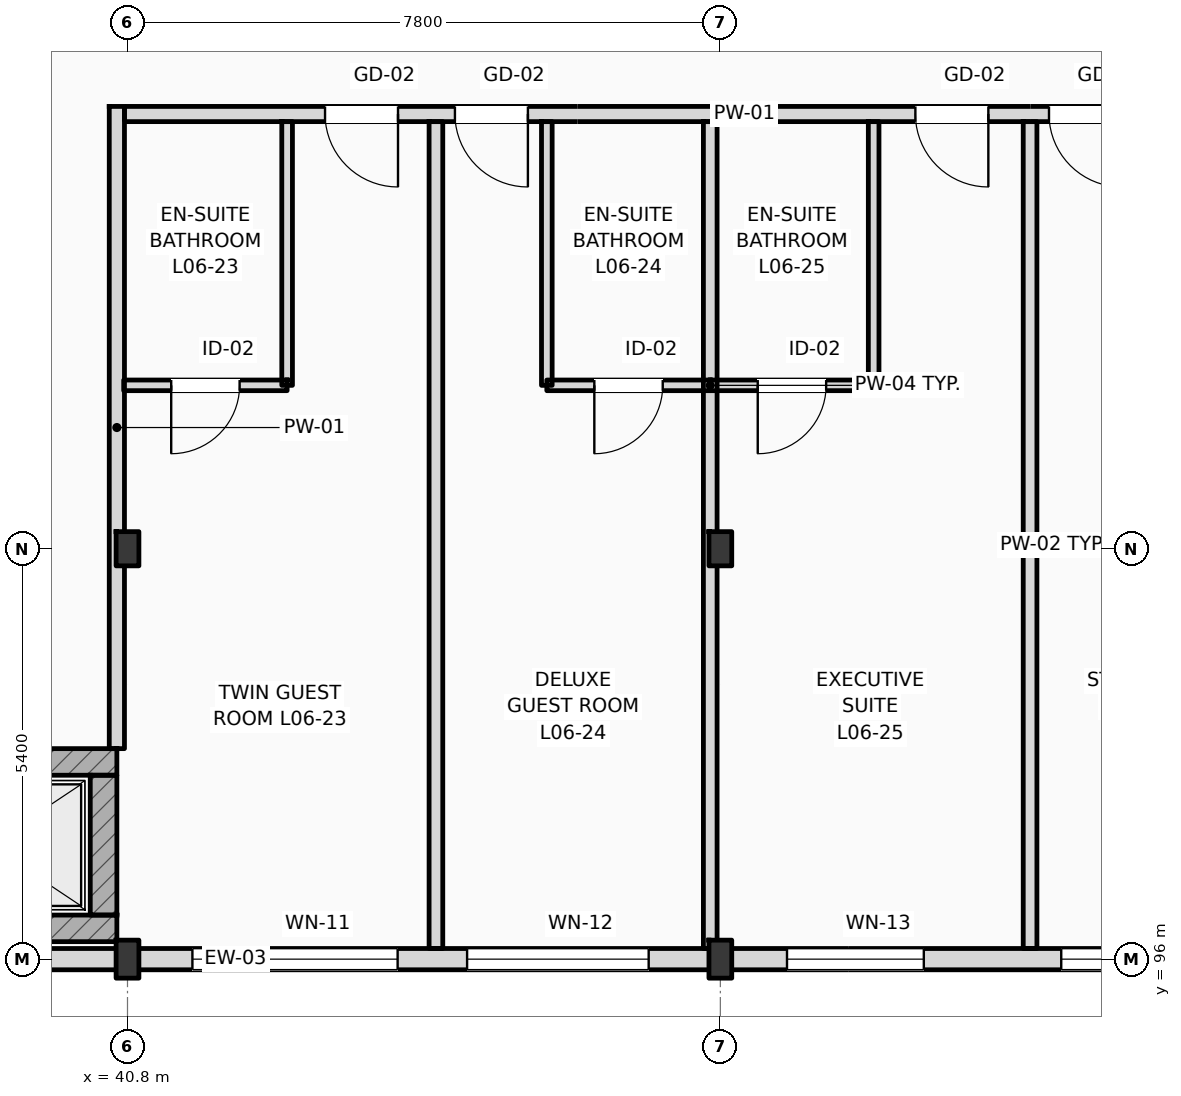
"""IFC4 building model, lengths in metres.
Left out: names, types, materials, properties, quantities, classifications, styles, units other than length and angle.
Written with IfcOpenShell. Run it as: python <this file> out.ifc"""

import sys

from ifc_helpers import new_model, si_unit, direction, frame, frame_2d, origin, origin_2d, place, context, subcontext, project, spatial, rectangle, i_section, extrude, element, fill, save


model = new_model("IFC4")
c1 = context("Model", 3, precision=1e-05, world=origin(), true_north=direction((0.0, 1.0)))
c2 = subcontext(c1, "Body", "Model", "MODEL_VIEW")
j1 = project(units=[si_unit("LENGTHUNIT", "METRE"), si_unit("PLANEANGLEUNIT", "RADIAN")], contexts=[c1])
p1 = place(None, origin())
s1 = spatial("IfcSite", under=j1, at=p1, CompositionType="ELEMENT")
p2 = place(p1, origin())
s2 = spatial("IfcBuilding", under=s1, at=p2, CompositionType="ELEMENT")
p3 = place(p2, frame((0.0, 0.0, 28.2)))
s3 = spatial("IfcBuildingStorey", under=s2, at=p3, CompositionType="ELEMENT", Elevation=28.2)
p4 = place(p3, frame((40.8, 96.0, 0.0), z_axis=(0.0, 0.0, 1.0), x_axis=(1.0, 0.0, 0.0)))
e1 = element("IfcColumn", 1, at=p4, inside=s3, PredefinedType="COLUMN", context=c2, shape_type="SweptSolid", body=[
    extrude(i_section(OverallWidth=0.3, OverallDepth=0.5, WebThickness=0.014, FlangeThickness=0.028, FilletRadius=0.027, at=origin_2d()), origin(), (0.0, 0.0, 1.0), 3.6),
])
p5 = place(p3, frame((40.8, 101.4, 0.0), z_axis=(0.0, 0.0, 1.0), x_axis=(1.0, 0.0, 0.0)))
e2 = element("IfcColumn", 2, at=p5, inside=s3, PredefinedType="COLUMN", context=c2, shape_type="SweptSolid", body=[
    extrude(i_section(OverallWidth=0.3, OverallDepth=0.45, WebThickness=0.014, FlangeThickness=0.026, FilletRadius=0.027, at=origin_2d()), origin(), (0.0, 0.0, 1.0), 3.6),
])
p6 = place(p3, frame((48.6, 96.0, 0.0), z_axis=(0.0, 0.0, 1.0), x_axis=(1.0, 0.0, 0.0)))
e3 = element("IfcColumn", 3, at=p6, inside=s3, PredefinedType="COLUMN", context=c2, shape_type="SweptSolid", body=[
    extrude(i_section(OverallWidth=0.3, OverallDepth=0.5, WebThickness=0.014, FlangeThickness=0.028, FilletRadius=0.027, at=origin_2d()), origin(), (0.0, 0.0, 1.0), 3.6),
])
p7 = place(p3, frame((48.6, 101.4, 0.0), z_axis=(0.0, 0.0, 1.0), x_axis=(1.0, 0.0, 0.0)))
e4 = element("IfcColumn", 4, at=p7, inside=s3, PredefinedType="COLUMN", context=c2, shape_type="SweptSolid", body=[
    extrude(i_section(OverallWidth=0.3, OverallDepth=0.45, WebThickness=0.014, FlangeThickness=0.026, FilletRadius=0.027, at=origin_2d()), origin(), (0.0, 0.0, 1.0), 3.6),
])
p8 = place(p3, frame((25.2, 96.0, 0.0), z_axis=(0.0, 0.0, 1.0), x_axis=(1.0, 0.0, 0.0)))
e5 = element("IfcWall", 5, at=p8, inside=s3, PredefinedType="STANDARD", context=c2, shape_type="SweptSolid", body=[
    extrude(rectangle(XDim=94.8, YDim=0.28, at=frame_2d((47.4, 0.0))), origin(), (0.0, 0.0, 1.0), 2.8),
])
p9 = place(p8, frame((16.454, 0.0, 0.9)))
e6 = element("IfcOpeningElement", 6, at=p9, cuts=e5, PredefinedType="OPENING", context=c2, shape_type="SweptSolid", body=[
    extrude(rectangle(XDim=2.7, YDim=1.72, at=frame_2d((1.35, 0.86))), frame((0.0, 0.15, 0.0), z_axis=(0.0, -1.0, 0.0), x_axis=(1.0, 0.0, 0.0)), (0.0, 0.0, 1.0), 0.3),
])
p10 = place(p8, frame((20.068, 0.0, 0.9)))
e7 = element("IfcOpeningElement", 7, at=p10, cuts=e5, PredefinedType="OPENING", context=c2, shape_type="SweptSolid", body=[
    extrude(rectangle(XDim=2.389, YDim=1.72, at=frame_2d((1.194, 0.86))), frame((0.0, 0.15, 0.0), z_axis=(0.0, -1.0, 0.0), x_axis=(1.0, 0.0, 0.0)), (0.0, 0.0, 1.0), 0.3),
])
p11 = place(p8, frame((24.277, 0.0, 0.9)))
e8 = element("IfcOpeningElement", 8, at=p11, cuts=e5, PredefinedType="OPENING", context=c2, shape_type="SweptSolid", body=[
    extrude(rectangle(XDim=1.8, YDim=1.72, at=frame_2d((0.9, 0.86))), frame((0.0, 0.15, 0.0), z_axis=(0.0, -1.0, 0.0), x_axis=(1.0, 0.0, 0.0)), (0.0, 0.0, 1.0), 0.3),
])
p12 = place(p8, frame((27.885, 0.0, 0.9)))
e9 = element("IfcOpeningElement", 9, at=p12, cuts=e5, PredefinedType="OPENING", context=c2, shape_type="SweptSolid", body=[
    extrude(rectangle(XDim=2.388, YDim=1.72, at=frame_2d((1.194, 0.86))), frame((0.0, 0.15, 0.0), z_axis=(0.0, -1.0, 0.0), x_axis=(1.0, 0.0, 0.0)), (0.0, 0.0, 1.0), 0.3),
])
p13 = place(p8, frame((32.093, 0.0, 0.9)))
e10 = element("IfcOpeningElement", 10, at=p13, cuts=e5, PredefinedType="OPENING", context=c2, shape_type="SweptSolid", body=[
    extrude(rectangle(XDim=1.8, YDim=1.72, at=frame_2d((0.9, 0.86))), frame((0.0, 0.15, 0.0), z_axis=(0.0, -1.0, 0.0), x_axis=(1.0, 0.0, 0.0)), (0.0, 0.0, 1.0), 0.3),
])
p14 = place(p8, frame((35.702, 0.0, 0.9)))
e11 = element("IfcOpeningElement", 11, at=p14, cuts=e5, PredefinedType="OPENING", context=c2, shape_type="SweptSolid", body=[
    extrude(rectangle(XDim=2.488, YDim=1.72, at=frame_2d((1.244, 0.86))), frame((0.0, 0.15, 0.0), z_axis=(0.0, -1.0, 0.0), x_axis=(1.0, 0.0, 0.0)), (0.0, 0.0, 1.0), 0.3),
])
p15 = place(p8, frame((55.56, 0.0, 0.9)))
e12 = element("IfcOpeningElement", 12, at=p15, cuts=e5, PredefinedType="OPENING", context=c2, shape_type="SweptSolid", body=[
    extrude(rectangle(XDim=1.8, YDim=1.72, at=frame_2d((0.9, 0.86))), frame((0.0, 0.15, 0.0), z_axis=(0.0, -1.0, 0.0), x_axis=(1.0, 0.0, 0.0)), (0.0, 0.0, 1.0), 0.3),
])
p16 = place(p8, frame((58.985, 0.0, 0.9)))
e13 = element("IfcOpeningElement", 13, at=p16, cuts=e5, PredefinedType="OPENING", context=c2, shape_type="SweptSolid", body=[
    extrude(rectangle(XDim=1.8, YDim=1.72, at=frame_2d((0.9, 0.86))), frame((0.0, 0.15, 0.0), z_axis=(0.0, -1.0, 0.0), x_axis=(1.0, 0.0, 0.0)), (0.0, 0.0, 1.0), 0.3),
])
p17 = place(p8, frame((63.21, 0.0, 0.9)))
e14 = element("IfcOpeningElement", 14, at=p17, cuts=e5, PredefinedType="OPENING", context=c2, shape_type="SweptSolid", body=[
    extrude(rectangle(XDim=2.525, YDim=1.72, at=frame_2d((1.262, 0.86))), frame((0.0, 0.15, 0.0), z_axis=(0.0, -1.0, 0.0), x_axis=(1.0, 0.0, 0.0)), (0.0, 0.0, 1.0), 0.3),
])
p18 = place(p8, frame((66.955, 0.0, 0.9)))
e15 = element("IfcOpeningElement", 15, at=p18, cuts=e5, PredefinedType="OPENING", context=c2, shape_type="SweptSolid", body=[
    extrude(rectangle(XDim=1.8, YDim=1.72, at=frame_2d((0.9, 0.86))), frame((0.0, 0.15, 0.0), z_axis=(0.0, -1.0, 0.0), x_axis=(1.0, 0.0, 0.0)), (0.0, 0.0, 1.0), 0.3),
])
p19 = place(p8, frame((71.892, 0.0, 0.9)))
e16 = element("IfcOpeningElement", 16, at=p19, cuts=e5, PredefinedType="OPENING", context=c2, shape_type="SweptSolid", body=[
    extrude(rectangle(XDim=1.1, YDim=1.5, at=frame_2d((0.55, 0.75))), frame((0.0, 0.15, 0.0), z_axis=(0.0, -1.0, 0.0), x_axis=(1.0, 0.0, 0.0)), (0.0, 0.0, 1.0), 0.3),
])
p20 = place(p8, frame((75.802, 0.0, 0.9)))
e17 = element("IfcOpeningElement", 17, at=p20, cuts=e5, PredefinedType="OPENING", context=c2, shape_type="SweptSolid", body=[
    extrude(rectangle(XDim=1.25, YDim=1.6, at=frame_2d((0.625, 0.8))), frame((0.0, 0.15, 0.0), z_axis=(0.0, -1.0, 0.0), x_axis=(1.0, 0.0, 0.0)), (0.0, 0.0, 1.0), 0.3),
])
p21 = place(p8, frame((79.712, 0.0, 0.9)))
e18 = element("IfcOpeningElement", 18, at=p21, cuts=e5, PredefinedType="OPENING", context=c2, shape_type="SweptSolid", body=[
    extrude(rectangle(XDim=1.4, YDim=1.7, at=frame_2d((0.7, 0.85))), frame((0.0, 0.15, 0.0), z_axis=(0.0, -1.0, 0.0), x_axis=(1.0, 0.0, 0.0)), (0.0, 0.0, 1.0), 0.3),
])
p22 = place(p8, frame((83.597, 0.0, 0.9)))
e19 = element("IfcOpeningElement", 19, at=p22, cuts=e5, PredefinedType="OPENING", context=c2, shape_type="SweptSolid", body=[
    extrude(rectangle(XDim=1.6, YDim=1.72, at=frame_2d((0.8, 0.86))), frame((0.0, 0.15, 0.0), z_axis=(0.0, -1.0, 0.0), x_axis=(1.0, 0.0, 0.0)), (0.0, 0.0, 1.0), 0.3),
])
p23 = place(p8, frame((87.507, 0.0, 0.9)))
e20 = element("IfcOpeningElement", 20, at=p23, cuts=e5, PredefinedType="OPENING", context=c2, shape_type="SweptSolid", body=[
    extrude(rectangle(XDim=1.75, YDim=1.72, at=frame_2d((0.875, 0.86))), frame((0.0, 0.15, 0.0), z_axis=(0.0, -1.0, 0.0), x_axis=(1.0, 0.0, 0.0)), (0.0, 0.0, 1.0), 0.3),
])
p24 = place(p8, frame((91.328, 0.0, 0.9)))
e21 = element("IfcOpeningElement", 21, at=p24, cuts=e5, PredefinedType="OPENING", context=c2, shape_type="SweptSolid", body=[
    extrude(rectangle(XDim=2.0, YDim=1.72, at=frame_2d((1.0, 0.86))), frame((0.0, 0.15, 0.0), z_axis=(0.0, -1.0, 0.0), x_axis=(1.0, 0.0, 0.0)), (0.0, 0.0, 1.0), 0.3),
])
p25 = place(p3, frame((37.67, 98.595, 0.0), z_axis=(0.0, 0.0, 1.0), x_axis=(1.0, 0.0, 0.0)))
e22 = element("IfcWall", 22, at=p25, inside=s3, PredefinedType="SHEAR", context=c2, shape_type="SweptSolid", body=[
    extrude(rectangle(XDim=2.99, YDim=0.35, at=frame_2d((1.495, 0.0))), origin(), (0.0, 0.0, 1.0), 3.36),
])
p26 = place(p25, frame((0.695, 0.0, 0.0)))
e23 = element("IfcOpeningElement", 23, at=p26, cuts=e22, PredefinedType="OPENING", context=c2, shape_type="SweptSolid", body=[
    extrude(rectangle(XDim=1.25, YDim=2.25, at=frame_2d((0.625, 1.125))), frame((0.0, 0.185, 0.0), z_axis=(0.0, -1.0, 0.0), x_axis=(1.0, 0.0, 0.0)), (0.0, 0.0, 1.0), 0.37),
])
p27 = place(p3, frame((37.67, 96.405, 0.0), z_axis=(0.0, 0.0, 1.0), x_axis=(1.0, 0.0, 0.0)))
e24 = element("IfcWall", 24, at=p27, inside=s3, PredefinedType="SHEAR", context=c2, shape_type="SweptSolid", body=[
    extrude(rectangle(XDim=2.99, YDim=0.35, at=frame_2d((1.495, 0.0))), origin(), (0.0, 0.0, 1.0), 3.36),
])
p28 = place(p3, frame((40.485, 96.58, 0.0), z_axis=(0.0, 0.0, 1.0), x_axis=(0.0, 1.0, 0.0)))
e25 = element("IfcWall", 25, at=p28, inside=s3, PredefinedType="SHEAR", context=c2, shape_type="SweptSolid", body=[
    extrude(rectangle(XDim=1.84, YDim=0.35, at=frame_2d((0.92, 0.0))), origin(), (0.0, 0.0, 1.0), 2.99),
])
p29 = place(p3, frame((40.76, 107.12, 0.0), z_axis=(0.0, 0.0, 1.0), x_axis=(1.0, 0.0, 0.0)))
e26 = element("IfcWall", 26, at=p29, inside=s3, PredefinedType="PARTITIONING", context=c2, shape_type="SweptSolid", body=[
    extrude(rectangle(XDim=23.44, YDim=0.2, at=frame_2d((11.72, 0.0))), origin(), (0.0, 0.0, 1.0), 3.36),
])
p30 = place(p29, frame((2.639, 0.0, 0.0)))
e27 = element("IfcOpeningElement", 27, at=p30, cuts=e26, PredefinedType="OPENING", context=c2, shape_type="SweptSolid", body=[
    extrude(rectangle(XDim=0.96, YDim=2.2, at=frame_2d((0.48, 1.1))), frame((0.0, 0.11, 0.0), z_axis=(0.0, -1.0, 0.0), x_axis=(1.0, 0.0, 0.0)), (0.0, 0.0, 1.0), 0.22),
])
p31 = place(p29, frame((4.348, 0.0, 0.0)))
e28 = element("IfcOpeningElement", 28, at=p31, cuts=e26, PredefinedType="OPENING", context=c2, shape_type="SweptSolid", body=[
    extrude(rectangle(XDim=0.96, YDim=2.2, at=frame_2d((0.48, 1.1))), frame((0.0, 0.11, 0.0), z_axis=(0.0, -1.0, 0.0), x_axis=(1.0, 0.0, 0.0)), (0.0, 0.0, 1.0), 0.22),
])
p32 = place(p29, frame((10.406, 0.0, 0.0)))
e29 = element("IfcOpeningElement", 29, at=p32, cuts=e26, PredefinedType="OPENING", context=c2, shape_type="SweptSolid", body=[
    extrude(rectangle(XDim=0.96, YDim=2.2, at=frame_2d((0.48, 1.1))), frame((0.0, 0.11, 0.0), z_axis=(0.0, -1.0, 0.0), x_axis=(1.0, 0.0, 0.0)), (0.0, 0.0, 1.0), 0.22),
])
p33 = place(p29, frame((12.164, 0.0, 0.0)))
e30 = element("IfcOpeningElement", 30, at=p33, cuts=e26, PredefinedType="OPENING", context=c2, shape_type="SweptSolid", body=[
    extrude(rectangle(XDim=0.96, YDim=2.2, at=frame_2d((0.48, 1.1))), frame((0.0, 0.11, 0.0), z_axis=(0.0, -1.0, 0.0), x_axis=(1.0, 0.0, 0.0)), (0.0, 0.0, 1.0), 0.22),
])
p34 = place(p29, frame((18.223, 0.0, 0.0)))
e31 = element("IfcOpeningElement", 31, at=p34, cuts=e26, PredefinedType="OPENING", context=c2, shape_type="SweptSolid", body=[
    extrude(rectangle(XDim=0.96, YDim=2.2, at=frame_2d((0.48, 1.1))), frame((0.0, 0.11, 0.0), z_axis=(0.0, -1.0, 0.0), x_axis=(1.0, 0.0, 0.0)), (0.0, 0.0, 1.0), 0.22),
])
p35 = place(p29, frame((20.031, 0.0, 0.0)))
e32 = element("IfcOpeningElement", 32, at=p35, cuts=e26, PredefinedType="OPENING", context=c2, shape_type="SweptSolid", body=[
    extrude(rectangle(XDim=0.96, YDim=2.2, at=frame_2d((0.48, 1.1))), frame((0.0, 0.11, 0.0), z_axis=(0.0, -1.0, 0.0), x_axis=(1.0, 0.0, 0.0)), (0.0, 0.0, 1.0), 0.22),
])
p36 = place(p3, frame((40.66, 98.77, 0.0), z_axis=(0.0, 0.0, 1.0), x_axis=(0.0, 1.0, 0.0)))
e33 = element("IfcWall", 33, at=p36, inside=s3, PredefinedType="PARTITIONING", context=c2, shape_type="SweptSolid", body=[
    extrude(rectangle(XDim=8.45, YDim=0.2, at=frame_2d((4.225, 0.0))), origin(), (0.0, 0.0, 1.0), 2.99),
])
p37 = place(p3, frame((44.858, 96.14, 0.0), z_axis=(0.0, 0.0, 1.0), x_axis=(0.0, 1.0, 0.0)))
e34 = element("IfcWall", 34, at=p37, inside=s3, PredefinedType="PARTITIONING", context=c2, shape_type="SweptSolid", body=[
    extrude(rectangle(XDim=10.88, YDim=0.18, at=frame_2d((5.44, 0.0))), origin(), (0.0, 0.0, 1.0), 3.36),
])
p38 = place(p3, frame((42.9, 103.55, 0.0), z_axis=(0.0, 0.0, 1.0), x_axis=(0.0, 1.0, 0.0)))
e35 = element("IfcWall", 35, at=p38, inside=s3, PredefinedType="PARTITIONING", context=c2, shape_type="SweptSolid", body=[
    extrude(rectangle(XDim=3.47, YDim=0.14, at=frame_2d((1.735, 0.0))), origin(), (0.0, 0.0, 1.0), 3.36),
])
p39 = place(p3, frame((40.75, 103.55, 0.0), z_axis=(0.0, 0.0, 1.0), x_axis=(1.0, 0.0, 0.0)))
e36 = element("IfcWall", 36, at=p39, inside=s3, PredefinedType="PARTITIONING", context=c2, shape_type="SweptSolid", body=[
    extrude(rectangle(XDim=2.15, YDim=0.14, at=frame_2d((1.075, 0.0))), origin(), (0.0, 0.0, 1.0), 3.36),
])
p40 = place(p39, frame((0.625, 0.0, 0.0)))
e37 = element("IfcOpeningElement", 37, at=p40, cuts=e36, PredefinedType="OPENING", context=c2, shape_type="SweptSolid", body=[
    extrude(rectangle(XDim=0.9, YDim=2.1, at=frame_2d((0.45, 1.05))), frame((0.0, 0.08, 0.0), z_axis=(0.0, -1.0, 0.0), x_axis=(1.0, 0.0, 0.0)), (0.0, 0.0, 1.0), 0.16),
])
p41 = place(p3, frame((48.467, 96.14, 0.0), z_axis=(0.0, 0.0, 1.0), x_axis=(0.0, 1.0, 0.0)))
e38 = element("IfcWall", 38, at=p41, inside=s3, PredefinedType="PARTITIONING", context=c2, shape_type="SweptSolid", body=[
    extrude(rectangle(XDim=10.88, YDim=0.18, at=frame_2d((5.44, 0.0))), origin(), (0.0, 0.0, 1.0), 2.99),
])
p42 = place(p3, frame((46.317, 103.55, 0.0), z_axis=(0.0, 0.0, 1.0), x_axis=(0.0, 1.0, 0.0)))
e39 = element("IfcWall", 39, at=p42, inside=s3, PredefinedType="PARTITIONING", context=c2, shape_type="SweptSolid", body=[
    extrude(rectangle(XDim=3.47, YDim=0.14, at=frame_2d((1.735, 0.0))), origin(), (0.0, 0.0, 1.0), 3.36),
])
p43 = place(p3, frame((46.317, 103.55, 0.0), z_axis=(0.0, 0.0, 1.0), x_axis=(1.0, 0.0, 0.0)))
e40 = element("IfcWall", 40, at=p43, inside=s3, PredefinedType="PARTITIONING", context=c2, shape_type="SweptSolid", body=[
    extrude(rectangle(XDim=2.15, YDim=0.14, at=frame_2d((1.075, 0.0))), origin(), (0.0, 0.0, 1.0), 3.36),
])
p44 = place(p43, frame((0.625, 0.0, 0.0)))
e41 = element("IfcOpeningElement", 41, at=p44, cuts=e40, PredefinedType="OPENING", context=c2, shape_type="SweptSolid", body=[
    extrude(rectangle(XDim=0.9, YDim=2.1, at=frame_2d((0.45, 1.05))), frame((0.0, 0.08, 0.0), z_axis=(0.0, -1.0, 0.0), x_axis=(1.0, 0.0, 0.0)), (0.0, 0.0, 1.0), 0.16),
])
p45 = place(p3, frame((52.675, 96.14, 0.0), z_axis=(0.0, 0.0, 1.0), x_axis=(0.0, 1.0, 0.0)))
e42 = element("IfcWall", 42, at=p45, inside=s3, PredefinedType="PARTITIONING", context=c2, shape_type="SweptSolid", body=[
    extrude(rectangle(XDim=10.88, YDim=0.18, at=frame_2d((5.44, 0.0))), origin(), (0.0, 0.0, 1.0), 3.36),
])
p46 = place(p3, frame((50.617, 103.55, 0.0), z_axis=(0.0, 0.0, 1.0), x_axis=(0.0, 1.0, 0.0)))
e43 = element("IfcWall", 43, at=p46, inside=s3, PredefinedType="PARTITIONING", context=c2, shape_type="SweptSolid", body=[
    extrude(rectangle(XDim=3.47, YDim=0.14, at=frame_2d((1.735, 0.0))), origin(), (0.0, 0.0, 1.0), 3.36),
])
p47 = place(p3, frame((48.467, 103.55, 0.0), z_axis=(0.0, 0.0, 1.0), x_axis=(1.0, 0.0, 0.0)))
e44 = element("IfcWall", 44, at=p47, inside=s3, PredefinedType="PARTITIONING", context=c2, shape_type="SweptSolid", body=[
    extrude(rectangle(XDim=2.15, YDim=0.14, at=frame_2d((1.075, 0.0))), origin(), (0.0, 0.0, 1.0), 3.36),
])
p48 = place(p47, frame((0.625, 0.0, 0.0)))
e45 = element("IfcOpeningElement", 45, at=p48, cuts=e44, PredefinedType="OPENING", context=c2, shape_type="SweptSolid", body=[
    extrude(rectangle(XDim=0.9, YDim=2.1, at=frame_2d((0.45, 1.05))), frame((0.0, 0.08, 0.0), z_axis=(0.0, -1.0, 0.0), x_axis=(1.0, 0.0, 0.0)), (0.0, 0.0, 1.0), 0.16),
])
p49 = place(p9, origin())
e46 = element("IfcWindow", 46, at=p49, inside=s3, PartitioningType="DOUBLE_PANEL_VERTICAL", PredefinedType="WINDOW", context=c2, shape_type="SweptSolid", body=[
    extrude(rectangle(XDim=2.7, YDim=1.72, at=frame_2d((1.35, 0.86))), frame((0.0, 0.03, 0.0), z_axis=(0.0, -1.0, 0.0), x_axis=(1.0, 0.0, 0.0)), (0.0, 0.0, 1.0), 0.06),
])
fill(e6, e46)
p50 = place(p10, origin())
e47 = element("IfcWindow", 47, at=p50, inside=s3, PartitioningType="DOUBLE_PANEL_VERTICAL", PredefinedType="WINDOW", context=c2, shape_type="SweptSolid", body=[
    extrude(rectangle(XDim=2.389, YDim=1.72, at=frame_2d((1.194, 0.86))), frame((0.0, 0.03, 0.0), z_axis=(0.0, -1.0, 0.0), x_axis=(1.0, 0.0, 0.0)), (0.0, 0.0, 1.0), 0.06),
])
fill(e7, e47)
p51 = place(p11, origin())
e48 = element("IfcWindow", 48, at=p51, inside=s3, PartitioningType="DOUBLE_PANEL_VERTICAL", PredefinedType="WINDOW", context=c2, shape_type="SweptSolid", body=[
    extrude(rectangle(XDim=1.8, YDim=1.72, at=frame_2d((0.9, 0.86))), frame((0.0, 0.03, 0.0), z_axis=(0.0, -1.0, 0.0), x_axis=(1.0, 0.0, 0.0)), (0.0, 0.0, 1.0), 0.06),
])
fill(e8, e48)
p52 = place(p12, origin())
e49 = element("IfcWindow", 49, at=p52, inside=s3, PartitioningType="DOUBLE_PANEL_VERTICAL", PredefinedType="WINDOW", context=c2, shape_type="SweptSolid", body=[
    extrude(rectangle(XDim=2.388, YDim=1.72, at=frame_2d((1.194, 0.86))), frame((0.0, 0.03, 0.0), z_axis=(0.0, -1.0, 0.0), x_axis=(1.0, 0.0, 0.0)), (0.0, 0.0, 1.0), 0.06),
])
fill(e9, e49)
p53 = place(p30, frame((0.96, 0.0, 0.0), z_axis=(0.0, 0.0, 1.0), x_axis=(-1.0, 0.0, 0.0)))
e50 = element("IfcDoor", 50, at=p53, inside=s3, OperationType="SINGLE_SWING_RIGHT", PredefinedType="DOOR", context=c2, shape_type="SweptSolid", body=[
    extrude(rectangle(XDim=0.96, YDim=2.2, at=frame_2d((0.48, 1.1))), frame((0.0, 0.025, 0.0), z_axis=(0.0, -1.0, 0.0), x_axis=(1.0, 0.0, 0.0)), (0.0, 0.0, 1.0), 0.05),
])
fill(e27, e50)
p54 = place(p40, frame((0.9, 0.0, 0.0), z_axis=(0.0, 0.0, 1.0), x_axis=(-1.0, 0.0, 0.0)))
e51 = element("IfcDoor", 51, at=p54, inside=s3, OperationType="SINGLE_SWING_LEFT", PredefinedType="DOOR", context=c2, shape_type="SweptSolid", body=[
    extrude(rectangle(XDim=0.9, YDim=2.1, at=frame_2d((0.45, 1.05))), frame((0.0, 0.025, 0.0), z_axis=(0.0, -1.0, 0.0), x_axis=(1.0, 0.0, 0.0)), (0.0, 0.0, 1.0), 0.05),
])
fill(e37, e51)
p55 = place(p31, frame((0.96, 0.0, 0.0), z_axis=(0.0, 0.0, 1.0), x_axis=(-1.0, 0.0, 0.0)))
e52 = element("IfcDoor", 52, at=p55, inside=s3, OperationType="SINGLE_SWING_RIGHT", PredefinedType="DOOR", context=c2, shape_type="SweptSolid", body=[
    extrude(rectangle(XDim=0.96, YDim=2.2, at=frame_2d((0.48, 1.1))), frame((0.0, 0.025, 0.0), z_axis=(0.0, -1.0, 0.0), x_axis=(1.0, 0.0, 0.0)), (0.0, 0.0, 1.0), 0.05),
])
fill(e28, e52)
p56 = place(p44, frame((0.9, 0.0, 0.0), z_axis=(0.0, 0.0, 1.0), x_axis=(-1.0, 0.0, 0.0)))
e53 = element("IfcDoor", 53, at=p56, inside=s3, OperationType="SINGLE_SWING_LEFT", PredefinedType="DOOR", context=c2, shape_type="SweptSolid", body=[
    extrude(rectangle(XDim=0.9, YDim=2.1, at=frame_2d((0.45, 1.05))), frame((0.0, 0.025, 0.0), z_axis=(0.0, -1.0, 0.0), x_axis=(1.0, 0.0, 0.0)), (0.0, 0.0, 1.0), 0.05),
])
fill(e41, e53)
p57 = place(p32, frame((0.96, 0.0, 0.0), z_axis=(0.0, 0.0, 1.0), x_axis=(-1.0, 0.0, 0.0)))
e54 = element("IfcDoor", 54, at=p57, inside=s3, OperationType="SINGLE_SWING_RIGHT", PredefinedType="DOOR", context=c2, shape_type="SweptSolid", body=[
    extrude(rectangle(XDim=0.96, YDim=2.2, at=frame_2d((0.48, 1.1))), frame((0.0, 0.025, 0.0), z_axis=(0.0, -1.0, 0.0), x_axis=(1.0, 0.0, 0.0)), (0.0, 0.0, 1.0), 0.05),
])
fill(e29, e54)
p58 = place(p48, frame((0.9, 0.0, 0.0), z_axis=(0.0, 0.0, 1.0), x_axis=(-1.0, 0.0, 0.0)))
e55 = element("IfcDoor", 55, at=p58, inside=s3, OperationType="SINGLE_SWING_LEFT", PredefinedType="DOOR", context=c2, shape_type="SweptSolid", body=[
    extrude(rectangle(XDim=0.9, YDim=2.1, at=frame_2d((0.45, 1.05))), frame((0.0, 0.025, 0.0), z_axis=(0.0, -1.0, 0.0), x_axis=(1.0, 0.0, 0.0)), (0.0, 0.0, 1.0), 0.05),
])
fill(e45, e55)
p59 = place(p33, frame((0.96, 0.0, 0.0), z_axis=(0.0, 0.0, 1.0), x_axis=(-1.0, 0.0, 0.0)))
e56 = element("IfcDoor", 56, at=p59, inside=s3, OperationType="SINGLE_SWING_RIGHT", PredefinedType="DOOR", context=c2, shape_type="SweptSolid", body=[
    extrude(rectangle(XDim=0.96, YDim=2.2, at=frame_2d((0.48, 1.1))), frame((0.0, 0.025, 0.0), z_axis=(0.0, -1.0, 0.0), x_axis=(1.0, 0.0, 0.0)), (0.0, 0.0, 1.0), 0.05),
])
fill(e30, e56)
save(model, sys.argv[1])
